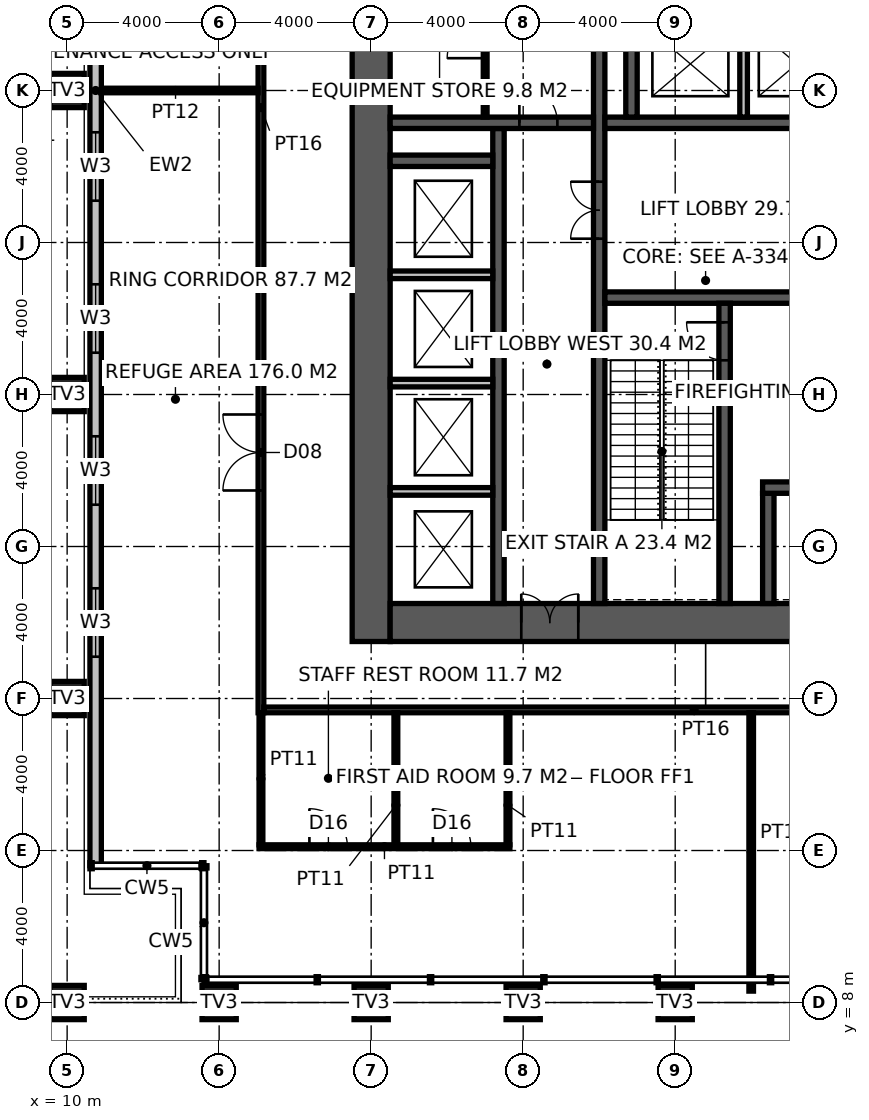
"""IFC4 building model, lengths in metres.
Left out: names, types, materials, properties, quantities, classifications, styles, units other than length and angle.
Written with IfcOpenShell. Run it as: python <this file> out.ifc"""

import sys

from ifc_helpers import new_model, si_unit, direction, frame, frame_2d, origin, origin_2d, place, context, subcontext, project, spatial, rectangle, hollow_rectangle, extrude, element, fill, save


model = new_model("IFC4")
c1 = context("Model", 3, precision=1e-05, world=origin(), true_north=direction((0.0, 1.0)))
c2 = subcontext(c1, "Body", "Model", "MODEL_VIEW")
j1 = project(units=[si_unit("LENGTHUNIT", "METRE"), si_unit("PLANEANGLEUNIT", "RADIAN")], contexts=[c1])
p1 = place(None, origin())
s1 = spatial("IfcSite", under=j1, at=p1, CompositionType="ELEMENT")
p2 = place(p1, origin())
s2 = spatial("IfcBuilding", under=s1, at=p2, CompositionType="ELEMENT")
p3 = place(p2, frame((0.0, 0.0, 203.8)))
s3 = spatial("IfcBuildingStorey", under=s2, at=p3, CompositionType="ELEMENT", Elevation=203.8)
for number, where, z_axis, x_axis in (
    (1, (10.0, 8.0, 0.0), (0.0, 0.0, 1.0), (1.0, 0.0, 0.0)),
    (2, (10.0, 16.0, 0.0), (0.0, 0.0, 1.0), (1.0, 0.0, 0.0)),
    (3, (10.0, 24.0, 0.0), (0.0, 0.0, 1.0), (1.0, 0.0, 0.0)),
    (4, (10.0, 32.0, 0.0), (0.0, 0.0, 1.0), (1.0, 0.0, 0.0)),
    (5, (14.0, 8.0, 0.0), (0.0, 0.0, 1.0), (1.0, 0.0, 0.0)),
    (6, (18.0, 8.0, 0.0), (0.0, 0.0, 1.0), (1.0, 0.0, 0.0)),
    (7, (22.0, 8.0, 0.0), (0.0, 0.0, 1.0), (1.0, 0.0, 0.0)),
    (8, (26.0, 8.0, 0.0), (0.0, 0.0, 1.0), (1.0, 0.0, 0.0)),
):
    element("IfcColumn", number, at=place(p3, frame(where, z_axis=z_axis, x_axis=x_axis)), inside=s3, PredefinedType="USERDEFINED", context=c2, shape_type="SweptSolid", body=[
        extrude(hollow_rectangle(XDim=0.9, YDim=0.9, WallThickness=0.08, at=origin_2d()), origin(), (0.0, 0.0, 1.0), 5.4),
    ])
p4 = place(p3, frame((18.0, 17.5, -0.15), z_axis=(0.0, 0.0, 1.0), x_axis=(0.0, 1.0, 0.0)))
e9 = element("IfcWall", 9, at=p4, inside=s3, PredefinedType="SHEAR", context=c2, shape_type="SweptSolid", body=[
    extrude(rectangle(XDim=19.0, YDim=1.0, at=frame_2d((9.5, 0.0))), origin(), (0.0, 0.0, 1.0), 5.4),
])
p5 = place(p3, frame((18.5, 18.0, -0.15), z_axis=(0.0, 0.0, 1.0), x_axis=(1.0, 0.0, 0.0)))
e10 = element("IfcWall", 10, at=p5, inside=s3, PredefinedType="SHEAR", context=c2, shape_type="SweptSolid", body=[
    extrude(rectangle(XDim=17.6, YDim=1.0, at=frame_2d((8.8, 0.0))), origin(), (0.0, 0.0, 1.0), 5.4),
])
p6 = place(p5, frame((3.45, 0.0, 0.15)))
e11 = element("IfcOpeningElement", 11, at=p6, cuts=e10, PredefinedType="OPENING", context=c2, shape_type="SweptSolid", body=[
    extrude(rectangle(XDim=1.5, YDim=2.4, at=frame_2d((0.75, 1.2))), frame((0.0, 0.51, 0.0), z_axis=(0.0, -1.0, 0.0), x_axis=(1.0, 0.0, 0.0)), (0.0, 0.0, 1.0), 1.02),
])
p7 = place(p3, frame((24.0, 18.5, -0.15), z_axis=(0.0, 0.0, 1.0), x_axis=(0.0, 1.0, 0.0)))
e12 = element("IfcWall", 12, at=p7, inside=s3, PredefinedType="SHEAR", context=c2, shape_type="SweptSolid", body=[
    extrude(rectangle(XDim=17.0, YDim=0.3, at=frame_2d((8.5, 0.0))), origin(), (0.0, 0.0, 1.0), 5.4),
])
p8 = place(p7, frame((9.6, 0.0, 0.15)))
e13 = element("IfcOpeningElement", 13, at=p8, cuts=e12, PredefinedType="OPENING", context=c2, shape_type="SweptSolid", body=[
    extrude(rectangle(XDim=1.5, YDim=2.4, at=frame_2d((0.75, 1.2))), frame((0.0, 0.16, 0.0), z_axis=(0.0, -1.0, 0.0), x_axis=(1.0, 0.0, 0.0)), (0.0, 0.0, 1.0), 0.32),
])
p9 = place(p3, frame((24.15, 26.55, -0.15), z_axis=(0.0, 0.0, 1.0), x_axis=(1.0, 0.0, 0.0)))
e14 = element("IfcWall", 14, at=p9, inside=s3, PredefinedType="SHEAR", context=c2, shape_type="SweptSolid", body=[
    extrude(rectangle(XDim=11.25, YDim=0.3, at=frame_2d((5.625, 0.0))), origin(), (0.0, 0.0, 1.0), 5.4),
])
p10 = place(p9, frame((9.25, 0.0, 0.15)))
e15 = element("IfcOpeningElement", 15, at=p10, cuts=e14, PredefinedType="OPENING", context=c2, shape_type="SweptSolid", body=[
    extrude(rectangle(XDim=1.0, YDim=2.2, at=frame_2d((0.5, 1.1))), frame((0.0, 0.16, 0.0), z_axis=(0.0, -1.0, 0.0), x_axis=(1.0, 0.0, 0.0)), (0.0, 0.0, 1.0), 0.32),
])
p11 = place(p9, frame((4.9, 0.0, 0.15)))
e16 = element("IfcOpeningElement", 16, at=p11, cuts=e14, PredefinedType="OPENING", context=c2, shape_type="SweptSolid", body=[
    extrude(rectangle(XDim=1.5, YDim=2.4, at=frame_2d((0.75, 1.2))), frame((0.0, 0.16, 0.0), z_axis=(0.0, -1.0, 0.0), x_axis=(1.0, 0.0, 0.0)), (0.0, 0.0, 1.0), 0.32),
])
p12 = place(p3, frame((27.3, 18.5, -0.15), z_axis=(0.0, 0.0, 1.0), x_axis=(0.0, 1.0, 0.0)))
e17 = element("IfcWall", 17, at=p12, inside=s3, PredefinedType="SHEAR", context=c2, shape_type="SweptSolid", body=[
    extrude(rectangle(XDim=7.9, YDim=0.3, at=frame_2d((3.95, 0.0))), origin(), (0.0, 0.0, 1.0), 5.4),
])
p13 = place(p12, frame((6.4, 0.0, 0.15)))
e18 = element("IfcOpeningElement", 18, at=p13, cuts=e17, PredefinedType="OPENING", context=c2, shape_type="SweptSolid", body=[
    extrude(rectangle(XDim=1.0, YDim=2.2, at=frame_2d((0.5, 1.1))), frame((0.0, 0.16, 0.0), z_axis=(0.0, -1.0, 0.0), x_axis=(1.0, 0.0, 0.0)), (0.0, 0.0, 1.0), 0.32),
])
p14 = place(p3, frame((28.45, 18.5, -0.15), z_axis=(0.0, 0.0, 1.0), x_axis=(0.0, 1.0, 0.0)))
e19 = element("IfcWall", 19, at=p14, inside=s3, PredefinedType="SHEAR", context=c2, shape_type="SweptSolid", body=[
    extrude(rectangle(XDim=2.9, YDim=0.3, at=frame_2d((1.45, 0.0))), origin(), (0.0, 0.0, 1.0), 5.4),
])
p15 = place(p3, frame((28.3, 21.55, -0.15), z_axis=(0.0, 0.0, 1.0), x_axis=(1.0, 0.0, 0.0)))
e20 = element("IfcWall", 20, at=p15, inside=s3, PredefinedType="SHEAR", context=c2, shape_type="SweptSolid", body=[
    extrude(rectangle(XDim=3.8, YDim=0.3, at=frame_2d((1.9, 0.0))), origin(), (0.0, 0.0, 1.0), 5.4),
])
p16 = place(p15, frame((1.05, 0.0, 0.15)))
e21 = element("IfcOpeningElement", 21, at=p16, cuts=e20, PredefinedType="OPENING", context=c2, shape_type="SweptSolid", body=[
    extrude(rectangle(XDim=1.3, YDim=2.4, at=frame_2d((0.65, 1.2))), frame((0.0, 0.16, 0.0), z_axis=(0.0, -1.0, 0.0), x_axis=(1.0, 0.0, 0.0)), (0.0, 0.0, 1.0), 0.32),
])
p17 = place(p3, frame((24.15, 31.15, -0.15), z_axis=(0.0, 0.0, 1.0), x_axis=(1.0, 0.0, 0.0)))
e22 = element("IfcWall", 22, at=p17, inside=s3, PredefinedType="SHEAR", context=c2, shape_type="SweptSolid", body=[
    extrude(rectangle(XDim=11.25, YDim=0.3, at=frame_2d((5.625, 0.0))), origin(), (0.0, 0.0, 1.0), 5.4),
])
p18 = place(p17, frame((7.25, 0.0, 0.15)))
e23 = element("IfcOpeningElement", 23, at=p18, cuts=e22, PredefinedType="OPENING", context=c2, shape_type="SweptSolid", body=[
    extrude(rectangle(XDim=1.4, YDim=2.4, at=frame_2d((0.7, 1.2))), frame((0.0, 0.16, 0.0), z_axis=(0.0, -1.0, 0.0), x_axis=(1.0, 0.0, 0.0)), (0.0, 0.0, 1.0), 0.32),
])
p19 = place(p3, frame((21.35, 18.5, -0.15), z_axis=(0.0, 0.0, 1.0), x_axis=(0.0, 1.0, 0.0)))
e24 = element("IfcWall", 24, at=p19, inside=s3, PredefinedType="SHEAR", context=c2, shape_type="SweptSolid", body=[
    extrude(rectangle(XDim=12.5, YDim=0.3, at=frame_2d((6.25, 0.0))), origin(), (0.0, 0.0, 1.0), 5.4),
])
p20 = place(p3, frame((18.5, 31.15, -0.15), z_axis=(0.0, 0.0, 1.0), x_axis=(1.0, 0.0, 0.0)))
e25 = element("IfcWall", 25, at=p20, inside=s3, PredefinedType="SHEAR", context=c2, shape_type="SweptSolid", body=[
    extrude(rectangle(XDim=5.35, YDim=0.3, at=frame_2d((2.675, 0.0))), origin(), (0.0, 0.0, 1.0), 5.4),
])
p21 = place(p20, frame((3.4, 0.0, 0.15)))
e26 = element("IfcOpeningElement", 26, at=p21, cuts=e25, PredefinedType="OPENING", context=c2, shape_type="SweptSolid", body=[
    extrude(rectangle(XDim=1.0, YDim=2.2, at=frame_2d((0.5, 1.1))), frame((0.0, 0.16, 0.0), z_axis=(0.0, -1.0, 0.0), x_axis=(1.0, 0.0, 0.0)), (0.0, 0.0, 1.0), 0.32),
])
p22 = place(p3, frame((18.5, 30.15, -0.15), z_axis=(0.0, 0.0, 1.0), x_axis=(1.0, 0.0, 0.0)))
e27 = element("IfcWall", 27, at=p22, inside=s3, PredefinedType="SHEAR", context=c2, shape_type="SweptSolid", body=[
    extrude(rectangle(XDim=2.7, YDim=0.3, at=frame_2d((1.35, 0.0))), origin(), (0.0, 0.0, 1.0), 5.4),
])
p23 = place(p3, frame((24.85, 31.3, -0.15), z_axis=(0.0, 0.0, 1.0), x_axis=(0.0, 1.0, 0.0)))
e28 = element("IfcWall", 28, at=p23, inside=s3, PredefinedType="SHEAR", context=c2, shape_type="SweptSolid", body=[
    extrude(rectangle(XDim=4.2, YDim=0.3, at=frame_2d((2.1, 0.0))), origin(), (0.0, 0.0, 1.0), 5.4),
])
p24 = place(p3, frame((27.8, 31.3, -0.15), z_axis=(0.0, 0.0, 1.0), x_axis=(0.0, 1.0, 0.0)))
e29 = element("IfcWall", 29, at=p24, inside=s3, PredefinedType="SOLIDWALL", context=c2, shape_type="SweptSolid", body=[
    extrude(rectangle(XDim=2.8, YDim=0.2, at=frame_2d((1.4, 0.0))), origin(), (0.0, 0.0, 1.0), 5.4),
])
for number, where, z_axis, x_axis in (
    (30, (18.5, 21.45, 0.0), (0.0, 0.0, 1.0), (1.0, 0.0, 0.0)),
    (31, (18.5, 24.3, 0.0), (0.0, 0.0, 1.0), (1.0, 0.0, 0.0)),
    (32, (18.5, 27.15, 0.0), (0.0, 0.0, 1.0), (1.0, 0.0, 0.0)),
):
    element("IfcWall", number, at=place(p3, frame(where, z_axis=z_axis, x_axis=x_axis)), inside=s3, PredefinedType="SOLIDWALL", context=c2, shape_type="SweptSolid", body=[
        extrude(rectangle(XDim=2.7, YDim=0.2, at=frame_2d((1.35, 0.0))), origin(), (0.0, 0.0, 1.0), 5.25),
    ])
p25 = place(p3, frame((21.0, 31.3, 0.0), z_axis=(0.0, 0.0, 1.0), x_axis=(0.0, 1.0, 0.0)))
e33 = element("IfcWall", 33, at=p25, inside=s3, PredefinedType="PARTITIONING", context=c2, shape_type="SweptSolid", body=[
    extrude(rectangle(XDim=4.2, YDim=0.1, at=frame_2d((2.1, 0.0))), origin(), (0.0, 0.0, 1.0), 5.25),
])
p26 = place(p25, frame((1.55, 0.0, 0.0)))
e34 = element("IfcOpeningElement", 34, at=p26, cuts=e33, PredefinedType="OPENING", context=c2, shape_type="SweptSolid", body=[
    extrude(rectangle(XDim=1.0, YDim=2.2, at=frame_2d((0.5, 1.1))), frame((0.0, 0.06, 0.0), z_axis=(0.0, -1.0, 0.0), x_axis=(1.0, 0.0, 0.0)), (0.0, 0.0, 1.0), 0.12),
])
p27 = place(p3, frame((15.1, 15.625, 0.0), z_axis=(0.0, 0.0, 1.0), x_axis=(0.0, 1.0, 0.0)))
e35 = element("IfcWall", 35, at=p27, inside=s3, PredefinedType="PARTITIONING", context=c2, shape_type="SweptSolid", body=[
    extrude(rectangle(XDim=22.75, YDim=0.15, at=frame_2d((11.375, 0.0))), origin(), (0.0, 0.0, 1.0), 5.25),
])
p28 = place(p27, frame((5.849, 0.0, 0.0)))
e36 = element("IfcOpeningElement", 36, at=p28, cuts=e35, PredefinedType="OPENING", context=c2, shape_type="SweptSolid", body=[
    extrude(rectangle(XDim=2.0, YDim=2.4, at=frame_2d((1.0, 1.2))), frame((0.0, 0.085, 0.0), z_axis=(0.0, -1.0, 0.0), x_axis=(1.0, 0.0, 0.0)), (0.0, 0.0, 1.0), 0.17),
])
p29 = place(p27, frame((18.0, 0.0, 0.0)))
e37 = element("IfcOpeningElement", 37, at=p29, cuts=e35, PredefinedType="OPENING", context=c2, shape_type="SweptSolid", body=[
    extrude(rectangle(XDim=3.0, YDim=3.3, at=frame_2d((1.5, 1.65))), frame((0.0, 0.085, 0.0), z_axis=(0.0, -1.0, 0.0), x_axis=(1.0, 0.0, 0.0)), (0.0, 0.0, 1.0), 0.17),
])
p30 = place(p3, frame((15.175, 15.7, 0.0), z_axis=(0.0, 0.0, 1.0), x_axis=(1.0, 0.0, 0.0)))
e38 = element("IfcWall", 38, at=p30, inside=s3, PredefinedType="PARTITIONING", context=c2, shape_type="SweptSolid", body=[
    extrude(rectangle(XDim=22.65, YDim=0.15, at=frame_2d((11.325, 0.0))), origin(), (0.0, 0.0, 1.0), 5.25),
])
p31 = place(p3, frame((28.0, 8.3, 0.0), z_axis=(0.0, 0.0, 1.0), x_axis=(0.0, 1.0, 0.0)))
e39 = element("IfcWall", 39, at=p31, inside=s3, PredefinedType="PARTITIONING", context=c2, shape_type="SweptSolid", body=[
    extrude(rectangle(XDim=7.325, YDim=0.12, at=frame_2d((3.663, 0.0))), origin(), (0.0, 0.0, 1.0), 5.25),
])
p32 = place(p3, frame((10.68, 32.0, 0.0), z_axis=(0.0, 0.0, 1.0), x_axis=(1.0, 0.0, 0.0)))
e40 = element("IfcWall", 40, at=p32, inside=s3, PredefinedType="PARTITIONING", context=c2, shape_type="SweptSolid", body=[
    extrude(rectangle(XDim=4.345, YDim=0.12, at=frame_2d((2.172, 0.0))), origin(), (0.0, 0.0, 1.0), 4.05),
])
p33 = place(p3, frame((15.05, 12.1, 0.0), z_axis=(0.0, 0.0, 1.0), x_axis=(1.0, 0.0, 0.0)))
e41 = element("IfcWall", 41, at=p33, inside=s3, PredefinedType="PARTITIONING", context=c2, shape_type="SweptSolid", body=[
    extrude(rectangle(XDim=6.6, YDim=0.1, at=frame_2d((3.3, 0.0))), origin(), (0.0, 0.0, 1.0), 5.25),
])
p34 = place(p33, frame((1.325, 0.0, 0.0)))
e42 = element("IfcOpeningElement", 42, at=p34, cuts=e41, PredefinedType="OPENING", context=c2, shape_type="SweptSolid", body=[
    extrude(rectangle(XDim=1.0, YDim=2.2, at=frame_2d((0.5, 1.1))), frame((0.0, 0.06, 0.0), z_axis=(0.0, -1.0, 0.0), x_axis=(1.0, 0.0, 0.0)), (0.0, 0.0, 1.0), 0.12),
])
p35 = place(p33, frame((4.575, 0.0, 0.0)))
e43 = element("IfcOpeningElement", 43, at=p35, cuts=e41, PredefinedType="OPENING", context=c2, shape_type="SweptSolid", body=[
    extrude(rectangle(XDim=1.0, YDim=2.2, at=frame_2d((0.5, 1.1))), frame((0.0, 0.06, 0.0), z_axis=(0.0, -1.0, 0.0), x_axis=(1.0, 0.0, 0.0)), (0.0, 0.0, 1.0), 0.12),
])
for number, where, z_axis, x_axis in (
    (44, (15.1, 12.15, 0.0), (0.0, 0.0, 1.0), (0.0, 1.0, 0.0)),
    (45, (18.65, 12.15, 0.0), (0.0, 0.0, 1.0), (0.0, 1.0, 0.0)),
    (46, (21.6, 12.15, 0.0), (0.0, 0.0, 1.0), (0.0, 1.0, 0.0)),
):
    element("IfcWall", number, at=place(p3, frame(where, z_axis=z_axis, x_axis=x_axis)), inside=s3, PredefinedType="PARTITIONING", context=c2, shape_type="SweptSolid", body=[
        extrude(rectangle(XDim=3.475, YDim=0.1, at=frame_2d((1.738, 0.0))), origin(), (0.0, 0.0, 1.0), 5.25),
    ])
p36 = place(p3, frame((10.75, 52.4, 0.0), z_axis=(0.0, 0.0, 1.0), x_axis=(0.0, -1.0, 0.0)))
e47 = element("IfcWall", 47, at=p36, inside=s3, PredefinedType="ELEMENTEDWALL", context=c2, shape_type="SweptSolid", body=[
    extrude(rectangle(XDim=40.8, YDim=0.3, at=frame_2d((20.4, 0.0))), origin(), (0.0, 0.0, 1.0), 5.25),
])
p37 = place(p36, frame((33.5, 0.0, 0.8)))
e48 = element("IfcOpeningElement", 48, at=p37, cuts=e47, PredefinedType="OPENING", context=c2, shape_type="SweptSolid", body=[
    extrude(rectangle(XDim=1.8, YDim=2.4, at=frame_2d((0.9, 1.2))), frame((0.0, 0.16, 0.0), z_axis=(0.0, -1.0, 0.0), x_axis=(1.0, 0.0, 0.0)), (0.0, 0.0, 1.0), 0.32),
])
p38 = place(p36, frame((29.5, 0.0, 0.8)))
e49 = element("IfcOpeningElement", 49, at=p38, cuts=e47, PredefinedType="OPENING", context=c2, shape_type="SweptSolid", body=[
    extrude(rectangle(XDim=1.8, YDim=2.4, at=frame_2d((0.9, 1.2))), frame((0.0, 0.16, 0.0), z_axis=(0.0, -1.0, 0.0), x_axis=(1.0, 0.0, 0.0)), (0.0, 0.0, 1.0), 0.32),
])
p39 = place(p36, frame((25.5, 0.0, 0.8)))
e50 = element("IfcOpeningElement", 50, at=p39, cuts=e47, PredefinedType="OPENING", context=c2, shape_type="SweptSolid", body=[
    extrude(rectangle(XDim=1.8, YDim=2.4, at=frame_2d((0.9, 1.2))), frame((0.0, 0.16, 0.0), z_axis=(0.0, -1.0, 0.0), x_axis=(1.0, 0.0, 0.0)), (0.0, 0.0, 1.0), 0.32),
])
p40 = place(p36, frame((21.5, 0.0, 0.8)))
e51 = element("IfcOpeningElement", 51, at=p40, cuts=e47, PredefinedType="OPENING", context=c2, shape_type="SweptSolid", body=[
    extrude(rectangle(XDim=1.8, YDim=2.4, at=frame_2d((0.9, 1.2))), frame((0.0, 0.16, 0.0), z_axis=(0.0, -1.0, 0.0), x_axis=(1.0, 0.0, 0.0)), (0.0, 0.0, 1.0), 0.32),
])
p41 = place(p36, frame((17.5, 0.0, 0.8)))
e52 = element("IfcOpeningElement", 52, at=p41, cuts=e47, PredefinedType="OPENING", context=c2, shape_type="SweptSolid", body=[
    extrude(rectangle(XDim=1.8, YDim=2.4, at=frame_2d((0.9, 1.2))), frame((0.0, 0.16, 0.0), z_axis=(0.0, -1.0, 0.0), x_axis=(1.0, 0.0, 0.0)), (0.0, 0.0, 1.0), 0.32),
])
p42 = place(p36, frame((13.5, 0.0, 0.0)))
e53 = element("IfcOpeningElement", 53, at=p42, cuts=e47, PredefinedType="OPENING", context=c2, shape_type="SweptSolid", body=[
    extrude(rectangle(XDim=1.8, YDim=2.4, at=frame_2d((0.9, 1.2))), frame((0.0, 0.16, 0.0), z_axis=(0.0, -1.0, 0.0), x_axis=(1.0, 0.0, 0.0)), (0.0, 0.0, 1.0), 0.32),
])
p43 = place(p36, frame((9.5, 0.0, 0.8)))
e54 = element("IfcOpeningElement", 54, at=p43, cuts=e47, PredefinedType="OPENING", context=c2, shape_type="SweptSolid", body=[
    extrude(rectangle(XDim=1.8, YDim=2.4, at=frame_2d((0.9, 1.2))), frame((0.0, 0.16, 0.0), z_axis=(0.0, -1.0, 0.0), x_axis=(1.0, 0.0, 0.0)), (0.0, 0.0, 1.0), 0.32),
])
p44 = place(p36, frame((5.5, 0.0, 0.8)))
e55 = element("IfcOpeningElement", 55, at=p44, cuts=e47, PredefinedType="OPENING", context=c2, shape_type="SweptSolid", body=[
    extrude(rectangle(XDim=1.8, YDim=2.4, at=frame_2d((0.9, 1.2))), frame((0.0, 0.16, 0.0), z_axis=(0.0, -1.0, 0.0), x_axis=(1.0, 0.0, 0.0)), (0.0, 0.0, 1.0), 0.32),
])
p45 = place(p13, origin())
e56 = element("IfcDoor", 56, at=p45, inside=s3, OperationType="SINGLE_SWING_RIGHT", PredefinedType="DOOR", context=c2, shape_type="SweptSolid", body=[
    extrude(rectangle(XDim=1.0, YDim=2.2, at=frame_2d((0.5, 1.1))), frame((0.0, 0.025, 0.0), z_axis=(0.0, -1.0, 0.0), x_axis=(1.0, 0.0, 0.0)), (0.0, 0.0, 1.0), 0.05),
])
fill(e18, e56)
p46 = place(p8, origin())
e57 = element("IfcDoor", 57, at=p46, inside=s3, OperationType="DOUBLE_DOOR_DOUBLE_SWING", PredefinedType="DOOR", context=c2, shape_type="SweptSolid", body=[
    extrude(rectangle(XDim=1.5, YDim=2.4, at=frame_2d((0.75, 1.2))), frame((0.0, 0.025, 0.0), z_axis=(0.0, -1.0, 0.0), x_axis=(1.0, 0.0, 0.0)), (0.0, 0.0, 1.0), 0.05),
])
fill(e13, e57)
p47 = place(p21, origin())
e58 = element("IfcDoor", 58, at=p47, inside=s3, OperationType="SINGLE_SWING_LEFT", PredefinedType="DOOR", context=c2, shape_type="SweptSolid", body=[
    extrude(rectangle(XDim=1.0, YDim=2.2, at=frame_2d((0.5, 1.1))), frame((0.0, 0.025, 0.0), z_axis=(0.0, -1.0, 0.0), x_axis=(1.0, 0.0, 0.0)), (0.0, 0.0, 1.0), 0.05),
])
fill(e26, e58)
p48 = place(p26, origin())
e59 = element("IfcDoor", 59, at=p48, inside=s3, OperationType="SINGLE_SWING_LEFT", PredefinedType="DOOR", context=c2, shape_type="SweptSolid", body=[
    extrude(rectangle(XDim=1.0, YDim=2.2, at=frame_2d((0.5, 1.1))), frame((0.0, 0.025, 0.0), z_axis=(0.0, -1.0, 0.0), x_axis=(1.0, 0.0, 0.0)), (0.0, 0.0, 1.0), 0.05),
])
fill(e34, e59)
p49 = place(p6, origin())
e60 = element("IfcDoor", 60, at=p49, inside=s3, OperationType="DOUBLE_DOOR_DOUBLE_SWING", PredefinedType="DOOR", context=c2, shape_type="SweptSolid", body=[
    extrude(rectangle(XDim=1.5, YDim=2.4, at=frame_2d((0.75, 1.2))), frame((0.0, 0.025, 0.0), z_axis=(0.0, -1.0, 0.0), x_axis=(1.0, 0.0, 0.0)), (0.0, 0.0, 1.0), 0.05),
])
fill(e11, e60)
p50 = place(p28, origin())
e61 = element("IfcDoor", 61, at=p50, inside=s3, OperationType="DOUBLE_DOOR_DOUBLE_SWING", PredefinedType="DOOR", context=c2, shape_type="SweptSolid", body=[
    extrude(rectangle(XDim=2.0, YDim=2.4, at=frame_2d((1.0, 1.2))), frame((0.0, 0.025, 0.0), z_axis=(0.0, -1.0, 0.0), x_axis=(1.0, 0.0, 0.0)), (0.0, 0.0, 1.0), 0.05),
])
fill(e36, e61)
p51 = place(p34, origin())
e62 = element("IfcDoor", 62, at=p51, inside=s3, OperationType="SINGLE_SWING_LEFT", PredefinedType="DOOR", context=c2, shape_type="SweptSolid", body=[
    extrude(rectangle(XDim=1.0, YDim=2.2, at=frame_2d((0.5, 1.1))), frame((0.0, 0.025, 0.0), z_axis=(0.0, -1.0, 0.0), x_axis=(1.0, 0.0, 0.0)), (0.0, 0.0, 1.0), 0.05),
])
fill(e42, e62)
p52 = place(p35, origin())
e63 = element("IfcDoor", 63, at=p52, inside=s3, OperationType="SINGLE_SWING_LEFT", PredefinedType="DOOR", context=c2, shape_type="SweptSolid", body=[
    extrude(rectangle(XDim=1.0, YDim=2.2, at=frame_2d((0.5, 1.1))), frame((0.0, 0.025, 0.0), z_axis=(0.0, -1.0, 0.0), x_axis=(1.0, 0.0, 0.0)), (0.0, 0.0, 1.0), 0.05),
])
fill(e43, e63)
p53 = place(p37, origin())
e64 = element("IfcWindow", 64, at=p53, inside=s3, PartitioningType="SINGLE_PANEL", PredefinedType="WINDOW", context=c2, shape_type="SweptSolid", body=[
    extrude(rectangle(XDim=1.8, YDim=2.4, at=frame_2d((0.9, 1.2))), frame((0.0, 0.03, 0.0), z_axis=(0.0, -1.0, 0.0), x_axis=(1.0, 0.0, 0.0)), (0.0, 0.0, 1.0), 0.06),
])
fill(e48, e64)
p54 = place(p38, origin())
e65 = element("IfcWindow", 65, at=p54, inside=s3, PartitioningType="SINGLE_PANEL", PredefinedType="WINDOW", context=c2, shape_type="SweptSolid", body=[
    extrude(rectangle(XDim=1.8, YDim=2.4, at=frame_2d((0.9, 1.2))), frame((0.0, 0.03, 0.0), z_axis=(0.0, -1.0, 0.0), x_axis=(1.0, 0.0, 0.0)), (0.0, 0.0, 1.0), 0.06),
])
fill(e49, e65)
p55 = place(p39, origin())
e66 = element("IfcWindow", 66, at=p55, inside=s3, PartitioningType="SINGLE_PANEL", PredefinedType="WINDOW", context=c2, shape_type="SweptSolid", body=[
    extrude(rectangle(XDim=1.8, YDim=2.4, at=frame_2d((0.9, 1.2))), frame((0.0, 0.03, 0.0), z_axis=(0.0, -1.0, 0.0), x_axis=(1.0, 0.0, 0.0)), (0.0, 0.0, 1.0), 0.06),
])
fill(e50, e66)
p56 = place(p40, origin())
e67 = element("IfcWindow", 67, at=p56, inside=s3, PartitioningType="SINGLE_PANEL", PredefinedType="WINDOW", context=c2, shape_type="SweptSolid", body=[
    extrude(rectangle(XDim=1.8, YDim=2.4, at=frame_2d((0.9, 1.2))), frame((0.0, 0.03, 0.0), z_axis=(0.0, -1.0, 0.0), x_axis=(1.0, 0.0, 0.0)), (0.0, 0.0, 1.0), 0.06),
])
fill(e51, e67)
save(model, sys.argv[1])
